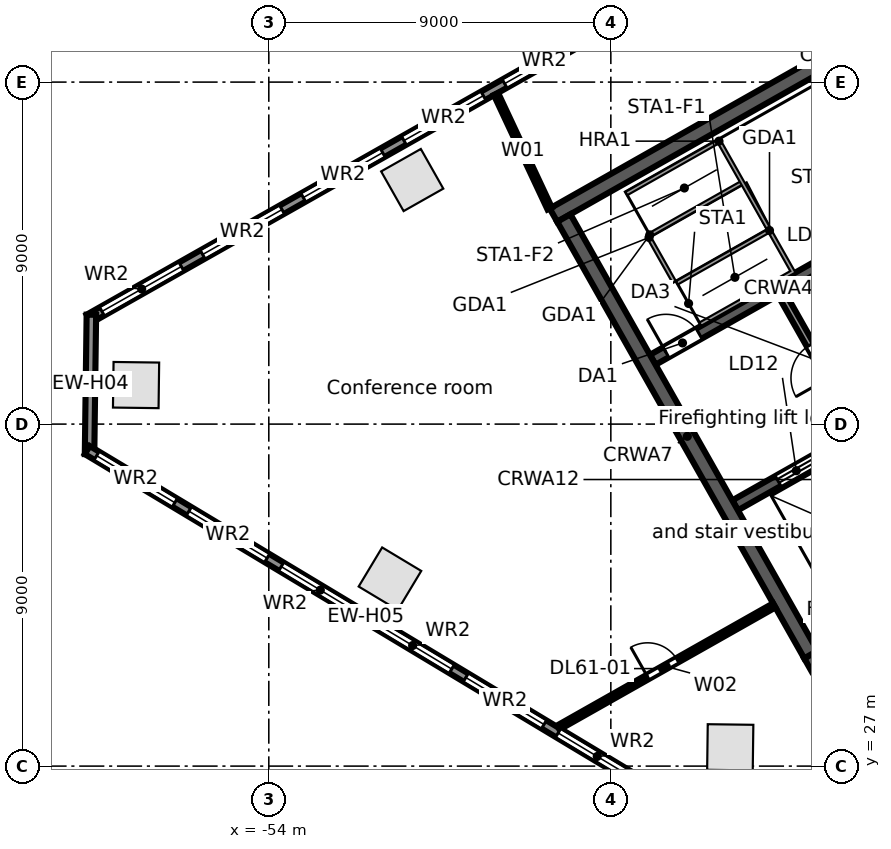
"""IFC4 building model, lengths in metres.
Left out: names, types, materials, properties, quantities, classifications, styles, units other than length and angle.
Written with IfcOpenShell. Run it as: python <this file> out.ifc"""

import sys

from ifc_helpers import new_model, si_unit, direction, frame, frame_2d, origin, origin_2d, place, context, subcontext, project, spatial, rectangle, extrude, element, fill, save


model = new_model("IFC4")
c1 = context("Model", 3, precision=1e-05, world=origin(), true_north=direction((0.0, 1.0)))
c2 = subcontext(c1, "Body", "Model", "MODEL_VIEW")
j1 = project(units=[si_unit("LENGTHUNIT", "METRE"), si_unit("PLANEANGLEUNIT", "RADIAN")], contexts=[c1])
p1 = place(None, origin())
s1 = spatial("IfcSite", under=j1, at=p1, CompositionType="ELEMENT")
p2 = place(p1, origin())
s2 = spatial("IfcBuilding", under=s1, at=p2, CompositionType="ELEMENT")
p3 = place(p2, frame((0.0, 0.0, 281.7)))
s3 = spatial("IfcBuildingStorey", under=s2, at=p3, CompositionType="ELEMENT", Elevation=281.7)
for number, where, z_axis, x_axis in (
    (1, (-50.226, 42.423, 0.0), (0.0, 0.0, 1.0), (-0.87, -0.492, 0.0)),
    (2, (-57.493, 37.027, 0.0), (0.0, 0.0, 1.0), (-0.013, -1.0, 0.0)),
    (3, (-50.812, 31.931, 0.0), (0.0, 0.0, 1.0), (0.857, -0.515, 0.0)),
    (4, (-41.858, 27.495, 0.0), (0.0, 0.0, 1.0), (1.0, -0.013, 0.0)),
):
    element("IfcColumn", number, at=place(p3, frame(where, z_axis=z_axis, x_axis=x_axis)), inside=s3, PredefinedType="COLUMN", context=c2, shape_type="SweptSolid", body=[
        extrude(rectangle(XDim=1.2, YDim=1.2, at=origin_2d()), origin(), (0.0, 0.0, 1.0), 3.8),
    ])
p4 = place(p3, frame((-58.732, 38.771, 0.0), z_axis=(0.0, 0.0, 1.0), x_axis=(0.870355615581, 0.492423702137, 0.0)))
e5 = element("IfcWall", 5, at=p4, inside=s3, PredefinedType="STANDARD", context=c2, shape_type="SweptSolid", body=[
    extrude(rectangle(XDim=64.052, YDim=0.25, at=frame_2d((32.026, 0.0))), origin(), (0.0, 0.0, 1.0), 3.45),
])
p5 = place(p4, frame((61.259, 0.0, 0.8)))
e6 = element("IfcOpeningElement", 6, at=p5, cuts=e5, PredefinedType="OPENING", context=c2, shape_type="SweptSolid", body=[
    extrude(rectangle(XDim=2.4, YDim=2.2, at=frame_2d((1.2, 1.1))), frame((0.0, 0.135, 0.0), z_axis=(0.0, -1.0, 0.0), x_axis=(1.0, 0.0, 0.0)), (0.0, 0.0, 1.0), 0.27),
])
p6 = place(p4, frame((58.216, 0.0, 0.8)))
e7 = element("IfcOpeningElement", 7, at=p6, cuts=e5, PredefinedType="OPENING", context=c2, shape_type="SweptSolid", body=[
    extrude(rectangle(XDim=2.4, YDim=2.2, at=frame_2d((1.2, 1.1))), frame((0.0, 0.135, 0.0), z_axis=(0.0, -1.0, 0.0), x_axis=(1.0, 0.0, 0.0)), (0.0, 0.0, 1.0), 0.27),
])
p7 = place(p4, frame((55.173, 0.0, 0.8)))
e8 = element("IfcOpeningElement", 8, at=p7, cuts=e5, PredefinedType="OPENING", context=c2, shape_type="SweptSolid", body=[
    extrude(rectangle(XDim=2.4, YDim=2.2, at=frame_2d((1.2, 1.1))), frame((0.0, 0.135, 0.0), z_axis=(0.0, -1.0, 0.0), x_axis=(1.0, 0.0, 0.0)), (0.0, 0.0, 1.0), 0.27),
])
p8 = place(p4, frame((52.129, 0.0, 0.8)))
e9 = element("IfcOpeningElement", 9, at=p8, cuts=e5, PredefinedType="OPENING", context=c2, shape_type="SweptSolid", body=[
    extrude(rectangle(XDim=2.4, YDim=2.2, at=frame_2d((1.2, 1.1))), frame((0.0, 0.135, 0.0), z_axis=(0.0, -1.0, 0.0), x_axis=(1.0, 0.0, 0.0)), (0.0, 0.0, 1.0), 0.27),
])
p9 = place(p4, frame((49.086, 0.0, 0.8)))
e10 = element("IfcOpeningElement", 10, at=p9, cuts=e5, PredefinedType="OPENING", context=c2, shape_type="SweptSolid", body=[
    extrude(rectangle(XDim=2.4, YDim=2.2, at=frame_2d((1.2, 1.1))), frame((0.0, 0.135, 0.0), z_axis=(0.0, -1.0, 0.0), x_axis=(1.0, 0.0, 0.0)), (0.0, 0.0, 1.0), 0.27),
])
p10 = place(p4, frame((46.043, 0.0, 0.8)))
e11 = element("IfcOpeningElement", 11, at=p10, cuts=e5, PredefinedType="OPENING", context=c2, shape_type="SweptSolid", body=[
    extrude(rectangle(XDim=2.4, YDim=2.2, at=frame_2d((1.2, 1.1))), frame((0.0, 0.135, 0.0), z_axis=(0.0, -1.0, 0.0), x_axis=(1.0, 0.0, 0.0)), (0.0, 0.0, 1.0), 0.27),
])
p11 = place(p4, frame((43.0, 0.0, 0.8)))
e12 = element("IfcOpeningElement", 12, at=p11, cuts=e5, PredefinedType="OPENING", context=c2, shape_type="SweptSolid", body=[
    extrude(rectangle(XDim=2.4, YDim=2.2, at=frame_2d((1.2, 1.1))), frame((0.0, 0.135, 0.0), z_axis=(0.0, -1.0, 0.0), x_axis=(1.0, 0.0, 0.0)), (0.0, 0.0, 1.0), 0.27),
])
p12 = place(p4, frame((39.956, 0.0, 0.8)))
e13 = element("IfcOpeningElement", 13, at=p12, cuts=e5, PredefinedType="OPENING", context=c2, shape_type="SweptSolid", body=[
    extrude(rectangle(XDim=2.4, YDim=2.2, at=frame_2d((1.2, 1.1))), frame((0.0, 0.135, 0.0), z_axis=(0.0, -1.0, 0.0), x_axis=(1.0, 0.0, 0.0)), (0.0, 0.0, 1.0), 0.27),
])
p13 = place(p4, frame((36.913, 0.0, 0.8)))
e14 = element("IfcOpeningElement", 14, at=p13, cuts=e5, PredefinedType="OPENING", context=c2, shape_type="SweptSolid", body=[
    extrude(rectangle(XDim=2.4, YDim=2.2, at=frame_2d((1.2, 1.1))), frame((0.0, 0.135, 0.0), z_axis=(0.0, -1.0, 0.0), x_axis=(1.0, 0.0, 0.0)), (0.0, 0.0, 1.0), 0.27),
])
p14 = place(p4, frame((33.87, 0.0, 0.8)))
e15 = element("IfcOpeningElement", 15, at=p14, cuts=e5, PredefinedType="OPENING", context=c2, shape_type="SweptSolid", body=[
    extrude(rectangle(XDim=2.4, YDim=2.2, at=frame_2d((1.2, 1.1))), frame((0.0, 0.135, 0.0), z_axis=(0.0, -1.0, 0.0), x_axis=(1.0, 0.0, 0.0)), (0.0, 0.0, 1.0), 0.27),
])
p15 = place(p4, frame((30.826, 0.0, 0.8)))
e16 = element("IfcOpeningElement", 16, at=p15, cuts=e5, PredefinedType="OPENING", context=c2, shape_type="SweptSolid", body=[
    extrude(rectangle(XDim=2.4, YDim=2.2, at=frame_2d((1.2, 1.1))), frame((0.0, 0.135, 0.0), z_axis=(0.0, -1.0, 0.0), x_axis=(1.0, 0.0, 0.0)), (0.0, 0.0, 1.0), 0.27),
])
p16 = place(p4, frame((27.783, 0.0, 0.8)))
e17 = element("IfcOpeningElement", 17, at=p16, cuts=e5, PredefinedType="OPENING", context=c2, shape_type="SweptSolid", body=[
    extrude(rectangle(XDim=2.4, YDim=2.2, at=frame_2d((1.2, 1.1))), frame((0.0, 0.135, 0.0), z_axis=(0.0, -1.0, 0.0), x_axis=(1.0, 0.0, 0.0)), (0.0, 0.0, 1.0), 0.27),
])
p17 = place(p4, frame((24.74, 0.0, 0.8)))
e18 = element("IfcOpeningElement", 18, at=p17, cuts=e5, PredefinedType="OPENING", context=c2, shape_type="SweptSolid", body=[
    extrude(rectangle(XDim=2.4, YDim=2.2, at=frame_2d((1.2, 1.1))), frame((0.0, 0.135, 0.0), z_axis=(0.0, -1.0, 0.0), x_axis=(1.0, 0.0, 0.0)), (0.0, 0.0, 1.0), 0.27),
])
p18 = place(p4, frame((21.696, 0.0, 0.8)))
e19 = element("IfcOpeningElement", 19, at=p18, cuts=e5, PredefinedType="OPENING", context=c2, shape_type="SweptSolid", body=[
    extrude(rectangle(XDim=2.4, YDim=2.2, at=frame_2d((1.2, 1.1))), frame((0.0, 0.135, 0.0), z_axis=(0.0, -1.0, 0.0), x_axis=(1.0, 0.0, 0.0)), (0.0, 0.0, 1.0), 0.27),
])
p19 = place(p4, frame((18.653, 0.0, 0.8)))
e20 = element("IfcOpeningElement", 20, at=p19, cuts=e5, PredefinedType="OPENING", context=c2, shape_type="SweptSolid", body=[
    extrude(rectangle(XDim=2.4, YDim=2.2, at=frame_2d((1.2, 1.1))), frame((0.0, 0.135, 0.0), z_axis=(0.0, -1.0, 0.0), x_axis=(1.0, 0.0, 0.0)), (0.0, 0.0, 1.0), 0.27),
])
p20 = place(p4, frame((15.61, 0.0, 0.8)))
e21 = element("IfcOpeningElement", 21, at=p20, cuts=e5, PredefinedType="OPENING", context=c2, shape_type="SweptSolid", body=[
    extrude(rectangle(XDim=2.4, YDim=2.2, at=frame_2d((1.2, 1.1))), frame((0.0, 0.135, 0.0), z_axis=(0.0, -1.0, 0.0), x_axis=(1.0, 0.0, 0.0)), (0.0, 0.0, 1.0), 0.27),
])
p21 = place(p4, frame((12.567, 0.0, 0.8)))
e22 = element("IfcOpeningElement", 22, at=p21, cuts=e5, PredefinedType="OPENING", context=c2, shape_type="SweptSolid", body=[
    extrude(rectangle(XDim=2.4, YDim=2.2, at=frame_2d((1.2, 1.1))), frame((0.0, 0.135, 0.0), z_axis=(0.0, -1.0, 0.0), x_axis=(1.0, 0.0, 0.0)), (0.0, 0.0, 1.0), 0.27),
])
p22 = place(p4, frame((9.523, 0.0, 0.8)))
e23 = element("IfcOpeningElement", 23, at=p22, cuts=e5, PredefinedType="OPENING", context=c2, shape_type="SweptSolid", body=[
    extrude(rectangle(XDim=2.4, YDim=2.2, at=frame_2d((1.2, 1.1))), frame((0.0, 0.135, 0.0), z_axis=(0.0, -1.0, 0.0), x_axis=(1.0, 0.0, 0.0)), (0.0, 0.0, 1.0), 0.27),
])
p23 = place(p4, frame((6.48, 0.0, 0.8)))
e24 = element("IfcOpeningElement", 24, at=p23, cuts=e5, PredefinedType="OPENING", context=c2, shape_type="SweptSolid", body=[
    extrude(rectangle(XDim=2.4, YDim=2.2, at=frame_2d((1.2, 1.1))), frame((0.0, 0.135, 0.0), z_axis=(0.0, -1.0, 0.0), x_axis=(1.0, 0.0, 0.0)), (0.0, 0.0, 1.0), 0.27),
])
p24 = place(p4, frame((3.437, 0.0, 0.8)))
e25 = element("IfcOpeningElement", 25, at=p24, cuts=e5, PredefinedType="OPENING", context=c2, shape_type="SweptSolid", body=[
    extrude(rectangle(XDim=2.4, YDim=2.2, at=frame_2d((1.2, 1.1))), frame((0.0, 0.135, 0.0), z_axis=(0.0, -1.0, 0.0), x_axis=(1.0, 0.0, 0.0)), (0.0, 0.0, 1.0), 0.27),
])
p25 = place(p4, frame((0.393, 0.0, 0.8)))
e26 = element("IfcOpeningElement", 26, at=p25, cuts=e5, PredefinedType="OPENING", context=c2, shape_type="SweptSolid", body=[
    extrude(rectangle(XDim=2.4, YDim=2.2, at=frame_2d((1.2, 1.1))), frame((0.0, 0.135, 0.0), z_axis=(0.0, -1.0, 0.0), x_axis=(1.0, 0.0, 0.0)), (0.0, 0.0, 1.0), 0.27),
])
p26 = place(p3, frame((-58.717, 35.208, 0.0), z_axis=(0.0, 0.0, 1.0), x_axis=(0.01310512158, 0.999914124207, 0.0)))
e27 = element("IfcWall", 27, at=p26, inside=s3, PredefinedType="STANDARD", context=c2, shape_type="SweptSolid", body=[
    extrude(rectangle(XDim=3.67, YDim=0.25, at=frame_2d((1.835, 0.0))), origin(), (0.0, 0.0, 1.0), 3.45),
])
p27 = place(p3, frame((-44.115, 26.507, 0.0), z_axis=(0.0, 0.0, 1.0), x_axis=(-0.857166583633, 0.515039268311, 0.0)))
e28 = element("IfcWall", 28, at=p27, inside=s3, PredefinedType="STANDARD", context=c2, shape_type="SweptSolid", body=[
    extrude(rectangle(XDim=17.106, YDim=0.25, at=frame_2d((8.553, 0.0))), origin(), (0.0, 0.0, 1.0), 3.45),
])
p28 = place(p27, frame((14.417, 0.0, 0.8)))
e29 = element("IfcOpeningElement", 29, at=p28, cuts=e28, PredefinedType="OPENING", context=c2, shape_type="SweptSolid", body=[
    extrude(rectangle(XDim=2.4, YDim=2.2, at=frame_2d((1.2, 1.1))), frame((0.0, 0.135, 0.0), z_axis=(0.0, -1.0, 0.0), x_axis=(1.0, 0.0, 0.0)), (0.0, 0.0, 1.0), 0.27),
])
p29 = place(p27, frame((11.584, 0.0, 0.8)))
e30 = element("IfcOpeningElement", 30, at=p29, cuts=e28, PredefinedType="OPENING", context=c2, shape_type="SweptSolid", body=[
    extrude(rectangle(XDim=2.4, YDim=2.2, at=frame_2d((1.2, 1.1))), frame((0.0, 0.135, 0.0), z_axis=(0.0, -1.0, 0.0), x_axis=(1.0, 0.0, 0.0)), (0.0, 0.0, 1.0), 0.27),
])
p30 = place(p27, frame((8.75, 0.0, 0.8)))
e31 = element("IfcOpeningElement", 31, at=p30, cuts=e28, PredefinedType="OPENING", context=c2, shape_type="SweptSolid", body=[
    extrude(rectangle(XDim=2.4, YDim=2.2, at=frame_2d((1.2, 1.1))), frame((0.0, 0.135, 0.0), z_axis=(0.0, -1.0, 0.0), x_axis=(1.0, 0.0, 0.0)), (0.0, 0.0, 1.0), 0.27),
])
p31 = place(p27, frame((5.917, 0.0, 0.8)))
e32 = element("IfcOpeningElement", 32, at=p31, cuts=e28, PredefinedType="OPENING", context=c2, shape_type="SweptSolid", body=[
    extrude(rectangle(XDim=2.4, YDim=2.2, at=frame_2d((1.2, 1.1))), frame((0.0, 0.135, 0.0), z_axis=(0.0, -1.0, 0.0), x_axis=(1.0, 0.0, 0.0)), (0.0, 0.0, 1.0), 0.27),
])
p32 = place(p27, frame((3.084, 0.0, 0.8)))
e33 = element("IfcOpeningElement", 33, at=p32, cuts=e28, PredefinedType="OPENING", context=c2, shape_type="SweptSolid", body=[
    extrude(rectangle(XDim=2.4, YDim=2.2, at=frame_2d((1.2, 1.1))), frame((0.0, 0.135, 0.0), z_axis=(0.0, -1.0, 0.0), x_axis=(1.0, 0.0, 0.0)), (0.0, 0.0, 1.0), 0.27),
])
p33 = place(p27, frame((0.25, 0.0, 0.8)))
e34 = element("IfcOpeningElement", 34, at=p33, cuts=e28, PredefinedType="OPENING", context=c2, shape_type="SweptSolid", body=[
    extrude(rectangle(XDim=2.4, YDim=2.2, at=frame_2d((1.2, 1.1))), frame((0.0, 0.135, 0.0), z_axis=(0.0, -1.0, 0.0), x_axis=(1.0, 0.0, 0.0)), (0.0, 0.0, 1.0), 0.27),
])
p34 = place(p3, frame((-39.813, 29.662, 0.0), z_axis=(0.0, 0.0, 1.0), x_axis=(0.870350116061, 0.492433422375, 0.0)))
e35 = element("IfcWall", 35, at=p34, inside=s3, PredefinedType="SOLIDWALL", context=c2, shape_type="SweptSolid", body=[
    extrude(rectangle(XDim=17.0, YDim=0.4, at=frame_2d((8.5, 0.0))), origin(), (0.0, 0.0, 1.0), 3.45),
])
p35 = place(p34, frame((7.2, 0.0, 0.0)))
e36 = element("IfcOpeningElement", 36, at=p35, cuts=e35, PredefinedType="OPENING", context=c2, shape_type="SweptSolid", body=[
    extrude(rectangle(XDim=1.2, YDim=2.1, at=frame_2d((0.6, 1.05))), frame((0.0, 0.21, 0.0), z_axis=(0.0, -1.0, 0.0), x_axis=(1.0, 0.0, 0.0)), (0.0, 0.0, 1.0), 0.42),
])
p36 = place(p3, frame((-41.73, 33.863, 0.0), z_axis=(0.0, 0.0, 1.0), x_axis=(0.870350800578, 0.492432212525, 0.0)))
e37 = element("IfcWall", 37, at=p36, inside=s3, PredefinedType="SOLIDWALL", context=c2, shape_type="SweptSolid", body=[
    extrude(rectangle(XDim=6.2, YDim=0.3, at=frame_2d((3.1, 0.0))), origin(), (0.0, 0.0, 1.0), 3.45),
])
p37 = place(p36, frame((1.3, 0.0, 0.0)))
e38 = element("IfcOpeningElement", 38, at=p37, cuts=e37, PredefinedType="OPENING", context=c2, shape_type="SweptSolid", body=[
    extrude(rectangle(XDim=1.1, YDim=2.1, at=frame_2d((0.55, 1.05))), frame((0.0, 0.16, 0.0), z_axis=(0.0, -1.0, 0.0), x_axis=(1.0, 0.0, 0.0)), (0.0, 0.0, 1.0), 0.32),
])
p38 = place(p36, frame((4.15, 0.0, 0.0)))
e39 = element("IfcOpeningElement", 39, at=p38, cuts=e37, PredefinedType="OPENING", context=c2, shape_type="SweptSolid", body=[
    extrude(rectangle(XDim=0.9, YDim=2.1, at=frame_2d((0.45, 1.05))), frame((0.0, 0.16, 0.0), z_axis=(0.0, -1.0, 0.0), x_axis=(1.0, 0.0, 0.0)), (0.0, 0.0, 1.0), 0.32),
])
p39 = place(p3, frame((-43.897, 37.692, 0.0), z_axis=(0.0, 0.0, 1.0), x_axis=(0.870356351998, 0.492422400523, 0.0)))
e40 = element("IfcWall", 40, at=p39, inside=s3, PredefinedType="SOLIDWALL", context=c2, shape_type="SweptSolid", body=[
    extrude(rectangle(XDim=7.6, YDim=0.3, at=frame_2d((3.8, 0.0))), origin(), (0.0, 0.0, 1.0), 3.45),
])
p40 = place(p39, frame((0.4, 0.0, 0.0)))
e41 = element("IfcOpeningElement", 41, at=p40, cuts=e40, PredefinedType="OPENING", context=c2, shape_type="SweptSolid", body=[
    extrude(rectangle(XDim=1.0, YDim=2.1, at=frame_2d((0.5, 1.05))), frame((0.0, 0.16, 0.0), z_axis=(0.0, -1.0, 0.0), x_axis=(1.0, 0.0, 0.0)), (0.0, 0.0, 1.0), 0.32),
])
p41 = place(p3, frame((-46.51, 41.499, 0.0), z_axis=(0.0, 0.0, 1.0), x_axis=(0.870356271124, 0.492422543467, 0.0)))
e42 = element("IfcWall", 42, at=p41, inside=s3, PredefinedType="SOLIDWALL", context=c2, shape_type="SweptSolid", body=[
    extrude(rectangle(XDim=17.0, YDim=0.4, at=frame_2d((8.5, 0.0))), origin(), (0.0, 0.0, 1.0), 3.45),
])
p42 = place(p3, frame((-46.238, 41.423, 0.0), z_axis=(0.0, 0.0, 1.0), x_axis=(0.492421663121, -0.870356769198, 0.0)))
e43 = element("IfcWall", 43, at=p42, inside=s3, PredefinedType="SOLIDWALL", context=c2, shape_type="SweptSolid", body=[
    extrude(rectangle(XDim=13.2, YDim=0.4, at=frame_2d((6.6, 0.0))), origin(), (0.0, 0.0, 1.0), 3.45),
])
p43 = place(p3, frame((-40.516, 39.433, 0.0), z_axis=(0.0, 0.0, 1.0), x_axis=(0.492453559952, -0.87033872216, 0.0)))
e44 = element("IfcWall", 44, at=p43, inside=s3, PredefinedType="PARTITIONING", context=c2, shape_type="SweptSolid", body=[
    extrude(rectangle(XDim=4.1, YDim=0.2, at=frame_2d((2.05, 0.0))), origin(), (0.0, 0.0, 1.0), 3.45),
])
p44 = place(p43, frame((1.55, 0.0, 0.0)))
e45 = element("IfcOpeningElement", 45, at=p44, cuts=e44, PredefinedType="OPENING", context=c2, shape_type="SweptSolid", body=[
    extrude(rectangle(XDim=1.0, YDim=2.1, at=frame_2d((0.5, 1.05))), frame((0.0, 0.11, 0.0), z_axis=(0.0, -1.0, 0.0), x_axis=(1.0, 0.0, 0.0)), (0.0, 0.0, 1.0), 0.22),
])
p45 = place(p3, frame((-48.022, 44.687, 0.0), z_axis=(0.0, 0.0, 1.0), x_axis=(0.424510917438, -0.905422818895, 0.0)))
e46 = element("IfcWall", 46, at=p45, inside=s3, PredefinedType="PARTITIONING", context=c2, shape_type="SweptSolid", body=[
    extrude(rectangle(XDim=3.329, YDim=0.125, at=frame_2d((1.665, 0.0))), origin(), (0.0, 0.0, 1.0), 2.73),
])
p46 = place(p3, frame((-46.381, 28.015, 0.0), z_axis=(0.0, 0.0, 1.0), x_axis=(0.870364232693, 0.492408471139, 0.0)))
e47 = element("IfcWall", 47, at=p46, inside=s3, PredefinedType="PARTITIONING", context=c2, shape_type="SweptSolid", body=[
    extrude(rectangle(XDim=6.527, YDim=0.125, at=frame_2d((3.264, 0.0))), origin(), (0.0, 0.0, 1.0), 2.73),
])
p47 = place(p46, frame((2.7, 0.0, 0.0)))
e48 = element("IfcOpeningElement", 48, at=p47, cuts=e47, PredefinedType="OPENING", context=c2, shape_type="SweptSolid", body=[
    extrude(rectangle(XDim=0.9, YDim=2.1, at=frame_2d((0.45, 1.05))), frame((0.0, 0.073, 0.0), z_axis=(0.0, -1.0, 0.0), x_axis=(1.0, 0.0, 0.0)), (0.0, 0.0, 1.0), 0.145),
])
p48 = place(p21, origin())
e49 = element("IfcWindow", 49, at=p48, inside=s3, PartitioningType="SINGLE_PANEL", PredefinedType="WINDOW", context=c2, shape_type="SweptSolid", body=[
    extrude(rectangle(XDim=2.4, YDim=2.2, at=frame_2d((1.2, 1.1))), frame((0.0, 0.03, 0.0), z_axis=(0.0, -1.0, 0.0), x_axis=(1.0, 0.0, 0.0)), (0.0, 0.0, 1.0), 0.06),
])
fill(e22, e49)
p49 = place(p22, origin())
e50 = element("IfcWindow", 50, at=p49, inside=s3, PartitioningType="SINGLE_PANEL", PredefinedType="WINDOW", context=c2, shape_type="SweptSolid", body=[
    extrude(rectangle(XDim=2.4, YDim=2.2, at=frame_2d((1.2, 1.1))), frame((0.0, 0.03, 0.0), z_axis=(0.0, -1.0, 0.0), x_axis=(1.0, 0.0, 0.0)), (0.0, 0.0, 1.0), 0.06),
])
fill(e23, e50)
p50 = place(p23, origin())
e51 = element("IfcWindow", 51, at=p50, inside=s3, PartitioningType="SINGLE_PANEL", PredefinedType="WINDOW", context=c2, shape_type="SweptSolid", body=[
    extrude(rectangle(XDim=2.4, YDim=2.2, at=frame_2d((1.2, 1.1))), frame((0.0, 0.03, 0.0), z_axis=(0.0, -1.0, 0.0), x_axis=(1.0, 0.0, 0.0)), (0.0, 0.0, 1.0), 0.06),
])
fill(e24, e51)
p51 = place(p24, origin())
e52 = element("IfcWindow", 52, at=p51, inside=s3, PartitioningType="SINGLE_PANEL", PredefinedType="WINDOW", context=c2, shape_type="SweptSolid", body=[
    extrude(rectangle(XDim=2.4, YDim=2.2, at=frame_2d((1.2, 1.1))), frame((0.0, 0.03, 0.0), z_axis=(0.0, -1.0, 0.0), x_axis=(1.0, 0.0, 0.0)), (0.0, 0.0, 1.0), 0.06),
])
fill(e25, e52)
p52 = place(p25, origin())
e53 = element("IfcWindow", 53, at=p52, inside=s3, PartitioningType="SINGLE_PANEL", PredefinedType="WINDOW", context=c2, shape_type="SweptSolid", body=[
    extrude(rectangle(XDim=2.4, YDim=2.2, at=frame_2d((1.2, 1.1))), frame((0.0, 0.03, 0.0), z_axis=(0.0, -1.0, 0.0), x_axis=(1.0, 0.0, 0.0)), (0.0, 0.0, 1.0), 0.06),
])
fill(e26, e53)
p53 = place(p28, origin())
e54 = element("IfcWindow", 54, at=p53, inside=s3, PartitioningType="SINGLE_PANEL", PredefinedType="WINDOW", context=c2, shape_type="SweptSolid", body=[
    extrude(rectangle(XDim=2.4, YDim=2.2, at=frame_2d((1.2, 1.1))), frame((0.0, 0.03, 0.0), z_axis=(0.0, -1.0, 0.0), x_axis=(1.0, 0.0, 0.0)), (0.0, 0.0, 1.0), 0.06),
])
fill(e29, e54)
p54 = place(p29, origin())
e55 = element("IfcWindow", 55, at=p54, inside=s3, PartitioningType="SINGLE_PANEL", PredefinedType="WINDOW", context=c2, shape_type="SweptSolid", body=[
    extrude(rectangle(XDim=2.4, YDim=2.2, at=frame_2d((1.2, 1.1))), frame((0.0, 0.03, 0.0), z_axis=(0.0, -1.0, 0.0), x_axis=(1.0, 0.0, 0.0)), (0.0, 0.0, 1.0), 0.06),
])
fill(e30, e55)
p55 = place(p30, origin())
e56 = element("IfcWindow", 56, at=p55, inside=s3, PartitioningType="SINGLE_PANEL", PredefinedType="WINDOW", context=c2, shape_type="SweptSolid", body=[
    extrude(rectangle(XDim=2.4, YDim=2.2, at=frame_2d((1.2, 1.1))), frame((0.0, 0.03, 0.0), z_axis=(0.0, -1.0, 0.0), x_axis=(1.0, 0.0, 0.0)), (0.0, 0.0, 1.0), 0.06),
])
fill(e31, e56)
p56 = place(p31, origin())
e57 = element("IfcWindow", 57, at=p56, inside=s3, PartitioningType="SINGLE_PANEL", PredefinedType="WINDOW", context=c2, shape_type="SweptSolid", body=[
    extrude(rectangle(XDim=2.4, YDim=2.2, at=frame_2d((1.2, 1.1))), frame((0.0, 0.03, 0.0), z_axis=(0.0, -1.0, 0.0), x_axis=(1.0, 0.0, 0.0)), (0.0, 0.0, 1.0), 0.06),
])
fill(e32, e57)
p57 = place(p32, origin())
e58 = element("IfcWindow", 58, at=p57, inside=s3, PartitioningType="SINGLE_PANEL", PredefinedType="WINDOW", context=c2, shape_type="SweptSolid", body=[
    extrude(rectangle(XDim=2.4, YDim=2.2, at=frame_2d((1.2, 1.1))), frame((0.0, 0.03, 0.0), z_axis=(0.0, -1.0, 0.0), x_axis=(1.0, 0.0, 0.0)), (0.0, 0.0, 1.0), 0.06),
])
fill(e33, e58)
p58 = place(p33, origin())
e59 = element("IfcWindow", 59, at=p58, inside=s3, PartitioningType="SINGLE_PANEL", PredefinedType="WINDOW", context=c2, shape_type="SweptSolid", body=[
    extrude(rectangle(XDim=2.4, YDim=2.2, at=frame_2d((1.2, 1.1))), frame((0.0, 0.03, 0.0), z_axis=(0.0, -1.0, 0.0), x_axis=(1.0, 0.0, 0.0)), (0.0, 0.0, 1.0), 0.06),
])
fill(e34, e59)
p59 = place(p37, origin())
e60 = element("IfcDoor", 60, at=p59, inside=s3, OperationType="DOUBLE_DOOR_SLIDING", PredefinedType="DOOR", context=c2, shape_type="SweptSolid", body=[
    extrude(rectangle(XDim=1.1, YDim=2.1, at=frame_2d((0.55, 1.05))), frame((0.0, 0.025, 0.0), z_axis=(0.0, -1.0, 0.0), x_axis=(1.0, 0.0, 0.0)), (0.0, 0.0, 1.0), 0.05),
])
fill(e38, e60)
p60 = place(p40, origin())
e61 = element("IfcDoor", 61, at=p60, inside=s3, OperationType="SINGLE_SWING_LEFT", PredefinedType="DOOR", context=c2, shape_type="SweptSolid", body=[
    extrude(rectangle(XDim=1.0, YDim=2.1, at=frame_2d((0.5, 1.05))), frame((0.0, 0.025, 0.0), z_axis=(0.0, -1.0, 0.0), x_axis=(1.0, 0.0, 0.0)), (0.0, 0.0, 1.0), 0.05),
])
fill(e41, e61)
p61 = place(p44, frame((1.0, 0.0, 0.0), z_axis=(0.0, 0.0, 1.0), x_axis=(-1.0, 0.0, 0.0)))
e62 = element("IfcDoor", 62, at=p61, inside=s3, OperationType="SINGLE_SWING_LEFT", PredefinedType="DOOR", context=c2, shape_type="SweptSolid", body=[
    extrude(rectangle(XDim=1.0, YDim=2.1, at=frame_2d((0.5, 1.05))), frame((0.0, 0.025, 0.0), z_axis=(0.0, -1.0, 0.0), x_axis=(1.0, 0.0, 0.0)), (0.0, 0.0, 1.0), 0.05),
])
fill(e45, e62)
p62 = place(p47, origin())
e63 = element("IfcDoor", 63, at=p62, inside=s3, OperationType="SINGLE_SWING_LEFT", PredefinedType="DOOR", context=c2, shape_type="SweptSolid", body=[
    extrude(rectangle(XDim=0.9, YDim=2.1, at=frame_2d((0.45, 1.05))), frame((0.0, 0.025, 0.0), z_axis=(0.0, -1.0, 0.0), x_axis=(1.0, 0.0, 0.0)), (0.0, 0.0, 1.0), 0.05),
])
fill(e48, e63)
save(model, sys.argv[1])
